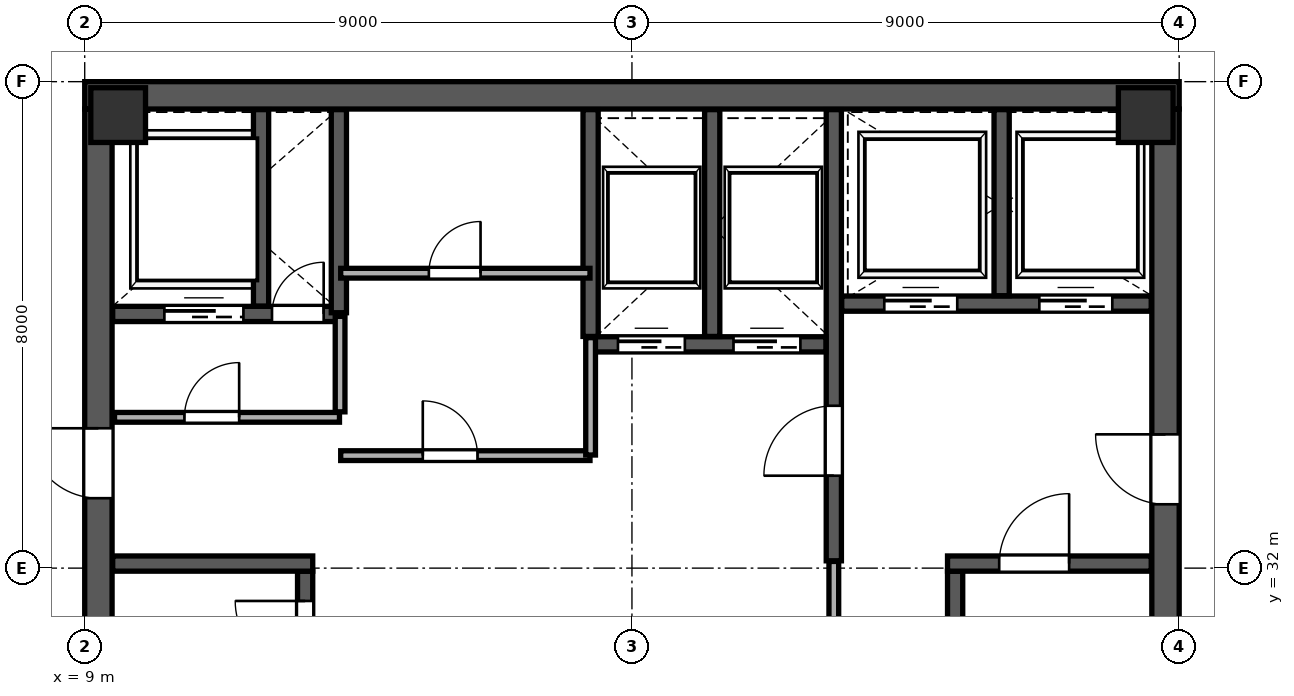
"""IFC4 building model, lengths in metres.
Left out: names, types, materials, properties, quantities, classifications, styles, units other than length and angle.
Written with IfcOpenShell. Run it as: python <this file> out.ifc"""

import sys

from ifc_helpers import new_model, si_unit, direction, frame, frame_2d, origin, origin_2d, place, context, subcontext, project, spatial, rectangle, extrude, source, transform, mapped, element, fill, save


model = new_model("IFC4")
c1 = context("Model", 3, precision=1e-05, world=origin(), true_north=direction((0.0, 1.0)))
c2 = subcontext(c1, "Body", "Model", "MODEL_VIEW")
j1 = project(units=[si_unit("LENGTHUNIT", "METRE"), si_unit("PLANEANGLEUNIT", "RADIAN")], contexts=[c1])
p1 = place(None, origin())
s1 = spatial("IfcSite", under=j1, at=p1, CompositionType="ELEMENT")
p2 = place(p1, origin())
s2 = spatial("IfcBuilding", under=s1, at=p2, CompositionType="ELEMENT")
p3 = place(p2, frame((0.0, 0.0, 266.8)))
s3 = spatial("IfcBuildingStorey", under=s2, at=p3, CompositionType="ELEMENT", Elevation=266.8)
m1 = source(origin(), c2, "Body", "SweptSolid", [
    extrude(rectangle(XDim=0.9, YDim=0.9, at=origin_2d()), origin(), (0.0, 0.0, 1.0), 4.198),
])
for number, where, z_axis, x_axis in (
    (1, (9.55, 39.45, 0.001), (0.0, 0.0, 1.0), (1.0, 0.0, 0.0)),
    (2, (26.45, 39.45, 0.001), (0.0, 0.0, 1.0), (1.0, 0.0, 0.0)),
):
    element("IfcColumn", number, at=place(p3, frame(where, z_axis=z_axis, x_axis=x_axis)), inside=s3, PredefinedType="COLUMN", context=c2, shape_type="MappedRepresentation", body=[
        mapped(m1, transform((0.0, 0.0, 0.0), scale=1.0)),
    ])
p4 = place(p3, frame((9.225, 24.45, 0.0), z_axis=(0.0, 0.0, 1.0), x_axis=(0.0, 1.0, 0.0)))
e3 = element("IfcWall", 3, at=p4, inside=s3, PredefinedType="SHEAR", context=c2, shape_type="SweptSolid", body=[
    extrude(rectangle(XDim=15.1, YDim=0.45, at=frame_2d((7.55, 0.0))), origin(), (0.0, 0.0, 1.0), 3.96),
])
p5 = place(p4, frame((8.7, 0.0, 0.0)))
e4 = element("IfcOpeningElement", 4, at=p5, cuts=e3, PredefinedType="OPENING", context=c2, shape_type="SweptSolid", body=[
    extrude(rectangle(XDim=1.15, YDim=2.2, at=frame_2d((0.575, 1.1))), frame((0.0, 0.235, 0.0), z_axis=(0.0, -1.0, 0.0), x_axis=(1.0, 0.0, 0.0)), (0.0, 0.0, 1.0), 0.47),
])
p6 = place(p3, frame((26.775, 24.45, 0.0), z_axis=(0.0, 0.0, 1.0), x_axis=(0.0, 1.0, 0.0)))
e5 = element("IfcWall", 5, at=p6, inside=s3, PredefinedType="SHEAR", context=c2, shape_type="SweptSolid", body=[
    extrude(rectangle(XDim=15.1, YDim=0.45, at=frame_2d((7.55, 0.0))), origin(), (0.0, 0.0, 1.0), 3.96),
])
p7 = place(p6, frame((8.6, 0.0, 0.0)))
e6 = element("IfcOpeningElement", 6, at=p7, cuts=e5, PredefinedType="OPENING", context=c2, shape_type="SweptSolid", body=[
    extrude(rectangle(XDim=1.15, YDim=2.2, at=frame_2d((0.575, 1.1))), frame((0.0, 0.235, 0.0), z_axis=(0.0, -1.0, 0.0), x_axis=(1.0, 0.0, 0.0)), (0.0, 0.0, 1.0), 0.47),
])
p8 = place(p3, frame((9.0, 39.775, 0.0), z_axis=(0.0, 0.0, 1.0), x_axis=(1.0, 0.0, 0.0)))
e7 = element("IfcWall", 7, at=p8, inside=s3, PredefinedType="SHEAR", context=c2, shape_type="SweptSolid", body=[
    extrude(rectangle(XDim=18.0, YDim=0.45, at=frame_2d((9.0, 0.0))), origin(), (0.0, 0.0, 1.0), 3.96),
])
p9 = place(p3, frame((12.625, 24.46, 0.0), z_axis=(0.0, 0.0, 1.0), x_axis=(0.0, 1.0, 0.0)))
e8 = element("IfcWall", 8, at=p9, inside=s3, PredefinedType="SHEAR", context=c2, shape_type="SweptSolid", body=[
    extrude(rectangle(XDim=7.49, YDim=0.25, at=frame_2d((3.745, 0.0))), origin(), (0.0, 0.0, 1.0), 3.96),
])
p10 = place(p9, frame((5.85, 0.0, 0.0)))
e9 = element("IfcOpeningElement", 9, at=p10, cuts=e8, PredefinedType="OPENING", context=c2, shape_type="SweptSolid", body=[
    extrude(rectangle(XDim=1.15, YDim=2.2, at=frame_2d((0.575, 1.1))), frame((0.0, 0.135, 0.0), z_axis=(0.0, -1.0, 0.0), x_axis=(1.0, 0.0, 0.0)), (0.0, 0.0, 1.0), 0.27),
])
p11 = place(p3, frame((9.46, 32.075, 0.0), z_axis=(0.0, 0.0, 1.0), x_axis=(1.0, 0.0, 0.0)))
e10 = element("IfcWall", 10, at=p11, inside=s3, PredefinedType="SHEAR", context=c2, shape_type="SweptSolid", body=[
    extrude(rectangle(XDim=3.29, YDim=0.25, at=frame_2d((1.645, 0.0))), origin(), (0.0, 0.0, 1.0), 3.96),
])
p12 = place(p3, frame((23.315, 24.46, 0.0), z_axis=(0.0, 0.0, 1.0), x_axis=(0.0, 1.0, 0.0)))
e11 = element("IfcWall", 11, at=p12, inside=s3, PredefinedType="SHEAR", context=c2, shape_type="SweptSolid", body=[
    extrude(rectangle(XDim=7.49, YDim=0.25, at=frame_2d((3.745, 0.0))), origin(), (0.0, 0.0, 1.0), 3.96),
])
p13 = place(p3, frame((23.19, 32.075, 0.0), z_axis=(0.0, 0.0, 1.0), x_axis=(1.0, 0.0, 0.0)))
e12 = element("IfcWall", 12, at=p13, inside=s3, PredefinedType="SHEAR", context=c2, shape_type="SweptSolid", body=[
    extrude(rectangle(XDim=3.35, YDim=0.25, at=frame_2d((1.675, 0.0))), origin(), (0.0, 0.0, 1.0), 3.96),
])
p14 = place(p13, frame((0.85, 0.0, 0.0)))
e13 = element("IfcOpeningElement", 13, at=p14, cuts=e12, PredefinedType="OPENING", context=c2, shape_type="SweptSolid", body=[
    extrude(rectangle(XDim=1.15, YDim=2.2, at=frame_2d((0.575, 1.1))), frame((0.0, 0.135, 0.0), z_axis=(0.0, -1.0, 0.0), x_axis=(1.0, 0.0, 0.0)), (0.0, 0.0, 1.0), 0.27),
])
p15 = place(p3, frame((21.32, 32.12, 0.0), z_axis=(0.0, 0.0, 1.0), x_axis=(0.0, 1.0, 0.0)))
e14 = element("IfcWall", 14, at=p15, inside=s3, PredefinedType="SHEAR", context=c2, shape_type="SweptSolid", body=[
    extrude(rectangle(XDim=7.42, YDim=0.25, at=frame_2d((3.71, 0.0))), origin(), (0.0, 0.0, 1.0), 3.96),
])
p16 = place(p15, frame((1.4, 0.0, 0.0)))
e15 = element("IfcOpeningElement", 15, at=p16, cuts=e14, PredefinedType="OPENING", context=c2, shape_type="SweptSolid", body=[
    extrude(rectangle(XDim=1.15, YDim=2.2, at=frame_2d((0.575, 1.1))), frame((0.0, 0.135, 0.0), z_axis=(0.0, -1.0, 0.0), x_axis=(1.0, 0.0, 0.0)), (0.0, 0.0, 1.0), 0.27),
])
p17 = place(p3, frame((9.46, 36.18, 0.0), z_axis=(0.0, 0.0, 1.0), x_axis=(1.0, 0.0, 0.0)))
e16 = element("IfcWall", 16, at=p17, inside=s3, PredefinedType="SHEAR", context=c2, shape_type="SweptSolid", body=[
    extrude(rectangle(XDim=3.79, YDim=0.25, at=frame_2d((1.895, 0.0))), origin(), (0.0, 0.0, 1.0), 3.96),
])
p18 = place(p17, frame((2.62, 0.0, 0.0)))
e17 = element("IfcOpeningElement", 17, at=p18, cuts=e16, PredefinedType="OPENING", context=c2, shape_type="SweptSolid", body=[
    extrude(rectangle(XDim=0.85, YDim=2.1, at=frame_2d((0.425, 1.05))), frame((0.0, 0.135, 0.0), z_axis=(0.0, -1.0, 0.0), x_axis=(1.0, 0.0, 0.0)), (0.0, 0.0, 1.0), 0.27),
])
p19 = place(p17, frame((0.85, 0.0, 0.0)))
e18 = element("IfcOpeningElement", 18, at=p19, cuts=e16, PredefinedType="OPENING", context=c2, shape_type="SweptSolid", body=[
    extrude(rectangle(XDim=1.3, YDim=2.25, at=frame_2d((0.65, 1.125))), frame((0.0, 0.135, 0.0), z_axis=(0.0, -1.0, 0.0), x_axis=(1.0, 0.0, 0.0)), (0.0, 0.0, 1.0), 0.27),
])
p20 = place(p3, frame((11.9, 36.31, 0.0), z_axis=(0.0, 0.0, 1.0), x_axis=(0.0, 1.0, 0.0)))
e19 = element("IfcWall", 19, at=p20, inside=s3, PredefinedType="SHEAR", context=c2, shape_type="SweptSolid", body=[
    extrude(rectangle(XDim=3.23, YDim=0.25, at=frame_2d((1.615, 0.0))), origin(), (0.0, 0.0, 1.0), 3.96),
])
p21 = place(p3, frame((21.45, 36.35, 0.0), z_axis=(0.0, 0.0, 1.0), x_axis=(1.0, 0.0, 0.0)))
e20 = element("IfcWall", 20, at=p21, inside=s3, PredefinedType="SHEAR", context=c2, shape_type="SweptSolid", body=[
    extrude(rectangle(XDim=5.09, YDim=0.25, at=frame_2d((2.545, 0.0))), origin(), (0.0, 0.0, 1.0), 3.96),
])
p22 = place(p21, frame((0.7, 0.0, 0.0)))
e21 = element("IfcOpeningElement", 21, at=p22, cuts=e20, PredefinedType="OPENING", context=c2, shape_type="SweptSolid", body=[
    extrude(rectangle(XDim=1.2, YDim=2.2, at=frame_2d((0.6, 1.1))), frame((0.0, 0.135, 0.0), z_axis=(0.0, -1.0, 0.0), x_axis=(1.0, 0.0, 0.0)), (0.0, 0.0, 1.0), 0.27),
])
p23 = place(p21, frame((3.25, 0.0, 0.0)))
e22 = element("IfcOpeningElement", 22, at=p23, cuts=e20, PredefinedType="OPENING", context=c2, shape_type="SweptSolid", body=[
    extrude(rectangle(XDim=1.2, YDim=2.2, at=frame_2d((0.6, 1.1))), frame((0.0, 0.135, 0.0), z_axis=(0.0, -1.0, 0.0), x_axis=(1.0, 0.0, 0.0)), (0.0, 0.0, 1.0), 0.27),
])
p24 = place(p3, frame((24.08, 36.48, 0.0), z_axis=(0.0, 0.0, 1.0), x_axis=(0.0, 1.0, 0.0)))
e23 = element("IfcWall", 23, at=p24, inside=s3, PredefinedType="SHEAR", context=c2, shape_type="SweptSolid", body=[
    extrude(rectangle(XDim=3.06, YDim=0.25, at=frame_2d((1.53, 0.0))), origin(), (0.0, 0.0, 1.0), 3.96),
])
p25 = place(p3, frame((13.18, 36.2, 0.0), z_axis=(0.0, 0.0, 1.0), x_axis=(0.0, 1.0, 0.0)))
e24 = element("IfcWall", 24, at=p25, inside=s3, PredefinedType="SHEAR", context=c2, shape_type="SweptSolid", body=[
    extrude(rectangle(XDim=3.34, YDim=0.25, at=frame_2d((1.67, 0.0))), origin(), (0.0, 0.0, 1.0), 3.96),
])
p26 = place(p3, frame((17.32, 35.68, 0.0), z_axis=(0.0, 0.0, 1.0), x_axis=(1.0, 0.0, 0.0)))
e25 = element("IfcWall", 25, at=p26, inside=s3, PredefinedType="SHEAR", context=c2, shape_type="SweptSolid", body=[
    extrude(rectangle(XDim=3.87, YDim=0.25, at=frame_2d((1.935, 0.0))), origin(), (0.0, 0.0, 1.0), 3.96),
])
p27 = place(p26, frame((0.45, 0.0, 0.0)))
e26 = element("IfcOpeningElement", 26, at=p27, cuts=e25, PredefinedType="OPENING", context=c2, shape_type="SweptSolid", body=[
    extrude(rectangle(XDim=1.1, YDim=2.2, at=frame_2d((0.55, 1.1))), frame((0.0, 0.135, 0.0), z_axis=(0.0, -1.0, 0.0), x_axis=(1.0, 0.0, 0.0)), (0.0, 0.0, 1.0), 0.27),
])
p28 = place(p26, frame((2.35, 0.0, 0.0)))
e27 = element("IfcOpeningElement", 27, at=p28, cuts=e25, PredefinedType="OPENING", context=c2, shape_type="SweptSolid", body=[
    extrude(rectangle(XDim=1.1, YDim=2.2, at=frame_2d((0.55, 1.1))), frame((0.0, 0.135, 0.0), z_axis=(0.0, -1.0, 0.0), x_axis=(1.0, 0.0, 0.0)), (0.0, 0.0, 1.0), 0.27),
])
for number, where, z_axis, x_axis in (
    (28, (17.32, 35.81, 0.0), (0.0, 0.0, 1.0), (0.0, 1.0, 0.0)),
    (29, (19.32, 35.81, 0.0), (0.0, 0.0, 1.0), (0.0, 1.0, 0.0)),
):
    element("IfcWall", number, at=place(p3, frame(where, z_axis=z_axis, x_axis=x_axis)), inside=s3, PredefinedType="SHEAR", context=c2, shape_type="SweptSolid", body=[
        extrude(rectangle(XDim=3.73, YDim=0.25, at=frame_2d((1.865, 0.0))), origin(), (0.0, 0.0, 1.0), 3.96),
    ])
p29 = place(p3, frame((9.49, 34.48, 0.0), z_axis=(0.0, 0.0, 1.0), x_axis=(1.0, 0.0, 0.0)))
e30 = element("IfcWall", 30, at=p29, inside=s3, PredefinedType="PARTITIONING", context=c2, shape_type="SweptSolid", body=[
    extrude(rectangle(XDim=3.7, YDim=0.16, at=frame_2d((1.85, 0.0))), origin(), (0.0, 0.0, 1.0), 3.96),
])
p30 = place(p29, frame((1.15, 0.0, 0.0)))
e31 = element("IfcOpeningElement", 31, at=p30, cuts=e30, PredefinedType="OPENING", context=c2, shape_type="SweptSolid", body=[
    extrude(rectangle(XDim=0.9, YDim=2.15, at=frame_2d((0.45, 1.075))), frame((0.0, 0.09, 0.0), z_axis=(0.0, -1.0, 0.0), x_axis=(1.0, 0.0, 0.0)), (0.0, 0.0, 1.0), 0.18),
])
p31 = place(p3, frame((13.2, 34.57, 0.0), z_axis=(0.0, 0.0, 1.0), x_axis=(0.0, 1.0, 0.0)))
e32 = element("IfcWall", 32, at=p31, inside=s3, PredefinedType="PARTITIONING", context=c2, shape_type="SweptSolid", body=[
    extrude(rectangle(XDim=1.57, YDim=0.16, at=frame_2d((0.785, 0.0))), origin(), (0.0, 0.0, 1.0), 3.96),
])
p32 = place(p3, frame((13.21, 33.85, 0.0), z_axis=(0.0, 0.0, 1.0), x_axis=(1.0, 0.0, 0.0)))
e33 = element("IfcWall", 33, at=p32, inside=s3, PredefinedType="PARTITIONING", context=c2, shape_type="SweptSolid", body=[
    extrude(rectangle(XDim=4.1, YDim=0.16, at=frame_2d((2.05, 0.0))), origin(), (0.0, 0.0, 1.0), 3.96),
])
p33 = place(p32, frame((1.35, 0.0, 0.0)))
e34 = element("IfcOpeningElement", 34, at=p33, cuts=e33, PredefinedType="OPENING", context=c2, shape_type="SweptSolid", body=[
    extrude(rectangle(XDim=0.9, YDim=2.15, at=frame_2d((0.45, 1.075))), frame((0.0, 0.09, 0.0), z_axis=(0.0, -1.0, 0.0), x_axis=(1.0, 0.0, 0.0)), (0.0, 0.0, 1.0), 0.18),
])
p34 = place(p3, frame((17.32, 33.86, 0.0), z_axis=(0.0, 0.0, 1.0), x_axis=(0.0, 1.0, 0.0)))
e35 = element("IfcWall", 35, at=p34, inside=s3, PredefinedType="PARTITIONING", context=c2, shape_type="SweptSolid", body=[
    extrude(rectangle(XDim=1.93, YDim=0.16, at=frame_2d((0.965, 0.0))), origin(), (0.0, 0.0, 1.0), 3.96),
])
p35 = place(p3, frame((13.21, 36.85, 0.0), z_axis=(0.0, 0.0, 1.0), x_axis=(1.0, 0.0, 0.0)))
e36 = element("IfcWall", 36, at=p35, inside=s3, PredefinedType="PARTITIONING", context=c2, shape_type="SweptSolid", body=[
    extrude(rectangle(XDim=4.1, YDim=0.16, at=frame_2d((2.05, 0.0))), origin(), (0.0, 0.0, 1.0), 3.96),
])
p36 = place(p35, frame((1.45, 0.0, 0.0)))
e37 = element("IfcOpeningElement", 37, at=p36, cuts=e36, PredefinedType="OPENING", context=c2, shape_type="SweptSolid", body=[
    extrude(rectangle(XDim=0.85, YDim=2.1, at=frame_2d((0.425, 1.05))), frame((0.0, 0.09, 0.0), z_axis=(0.0, -1.0, 0.0), x_axis=(1.0, 0.0, 0.0)), (0.0, 0.0, 1.0), 0.18),
])
p37 = place(p3, frame((21.32, 29.19, 0.0), z_axis=(0.0, 0.0, 1.0), x_axis=(0.0, 1.0, 0.0)))
e38 = element("IfcWall", 38, at=p37, inside=s3, PredefinedType="PARTITIONING", context=c2, shape_type="SweptSolid", body=[
    extrude(rectangle(XDim=2.92, YDim=0.16, at=frame_2d((1.46, 0.0))), origin(), (0.0, 0.0, 1.0), 3.96),
])
p38 = place(p3, frame((19.528, 51.245, 0.0), z_axis=(0.0, 0.0, 1.0), x_axis=(0.642782364439, -0.766048844374, 0.0)))
e39 = element("IfcWall", 39, at=p38, inside=s3, PredefinedType="PARTITIONING", context=c2, shape_type="SweptSolid", body=[
    extrude(rectangle(XDim=27.34, YDim=0.135, at=frame_2d((13.67, 0.0))), origin(), (0.0, 0.0, 1.0), 3.96),
])
p39 = place(p38, frame((10.8, 0.0, 0.0)))
e40 = element("IfcOpeningElement", 40, at=p39, cuts=e39, PredefinedType="OPENING", context=c2, shape_type="SweptSolid", body=[
    extrude(rectangle(XDim=0.95, YDim=2.15, at=frame_2d((0.475, 1.075))), frame((0.0, 0.078, 0.0), z_axis=(0.0, -1.0, 0.0), x_axis=(1.0, 0.0, 0.0)), (0.0, 0.0, 1.0), 0.155),
])
p40 = place(p3, frame((0.849, 35.624, 0.0), z_axis=(0.0, 0.0, 1.0), x_axis=(0.766042777978, 0.642789594119, 0.0)))
e41 = element("IfcWall", 41, at=p40, inside=s3, PredefinedType="PARTITIONING", context=c2, shape_type="SweptSolid", body=[
    extrude(rectangle(XDim=29.51, YDim=0.1, at=frame_2d((14.755, 0.0))), origin(), (0.0, 0.0, 1.0), 3.96),
])
p41 = place(p40, frame((2.6, 0.0, 0.0)))
e42 = element("IfcOpeningElement", 42, at=p41, cuts=e41, PredefinedType="OPENING", context=c2, shape_type="SweptSolid", body=[
    extrude(rectangle(XDim=0.95, YDim=2.15, at=frame_2d((0.475, 1.075))), frame((0.0, 0.06, 0.0), z_axis=(0.0, -1.0, 0.0), x_axis=(1.0, 0.0, 0.0)), (0.0, 0.0, 1.0), 0.12),
])
p42 = place(p3, frame((25.576, 20.577, 0.0), z_axis=(0.0, 0.0, 1.0), x_axis=(0.76604764673, 0.642783791752, 0.0)))
e43 = element("IfcWall", 43, at=p42, inside=s3, PredefinedType="PARTITIONING", context=c2, shape_type="SweptSolid", body=[
    extrude(rectangle(XDim=20.24, YDim=0.16, at=frame_2d((10.12, 0.0))), origin(), (0.0, 0.0, 1.0), 3.195),
])
m2 = source(origin(), c2, "Body", "SweptSolid", [
    extrude(rectangle(XDim=1.15, YDim=2.2, at=frame_2d((0.575, 1.1))), frame((0.0, 0.025, 0.0), z_axis=(0.0, -1.0, 0.0), x_axis=(1.0, 0.0, 0.0)), (0.0, 0.0, 1.0), 0.05),
])
p43 = place(p10, origin())
e44 = element("IfcDoor", 44, at=p43, inside=s3, OperationType="SINGLE_SWING_RIGHT", PredefinedType="DOOR", context=c2, shape_type="MappedRepresentation", body=[
    mapped(m2, transform((0.0, 0.0, 0.0), scale=1.0)),
])
fill(e9, e44)
m3 = source(origin(), c2, "Body", "SweptSolid", [
    extrude(rectangle(XDim=1.15, YDim=2.2, at=frame_2d((0.575, 1.1))), frame((0.0, 0.025, 0.0), z_axis=(0.0, -1.0, 0.0), x_axis=(1.0, 0.0, 0.0)), (0.0, 0.0, 1.0), 0.05),
])
p44 = place(p16, origin())
e45 = element("IfcDoor", 45, at=p44, inside=s3, OperationType="SINGLE_SWING_LEFT", PredefinedType="DOOR", context=c2, shape_type="MappedRepresentation", body=[
    mapped(m3, transform((0.0, 0.0, 0.0), scale=1.0)),
])
fill(e15, e45)
p45 = place(p14, origin())
e46 = element("IfcDoor", 46, at=p45, inside=s3, OperationType="SINGLE_SWING_RIGHT", PredefinedType="DOOR", context=c2, shape_type="MappedRepresentation", body=[
    mapped(m2, transform((0.0, 0.0, 0.0), scale=1.0)),
])
fill(e13, e46)
p46 = place(p7, origin())
e47 = element("IfcDoor", 47, at=p46, inside=s3, OperationType="SINGLE_SWING_RIGHT", PredefinedType="DOOR", context=c2, shape_type="MappedRepresentation", body=[
    mapped(m3, transform((0.0, 0.0, 0.0), scale=1.0)),
])
fill(e6, e47)
p47 = place(p5, origin())
e48 = element("IfcDoor", 48, at=p47, inside=s3, OperationType="SINGLE_SWING_RIGHT", PredefinedType="DOOR", context=c2, shape_type="MappedRepresentation", body=[
    mapped(m3, transform((0.0, 0.0, 0.0), scale=1.0)),
])
fill(e4, e48)
m4 = source(origin(), c2, "Body", "SweptSolid", [
    extrude(rectangle(XDim=0.85, YDim=2.1, at=frame_2d((0.425, 1.05))), frame((0.0, 0.025, 0.0), z_axis=(0.0, -1.0, 0.0), x_axis=(1.0, 0.0, 0.0)), (0.0, 0.0, 1.0), 0.05),
])
p48 = place(p18, origin())
e49 = element("IfcDoor", 49, at=p48, inside=s3, OperationType="SINGLE_SWING_RIGHT", PredefinedType="DOOR", context=c2, shape_type="MappedRepresentation", body=[
    mapped(m4, transform((0.0, 0.0, 0.0), scale=1.0)),
])
fill(e17, e49)
m5 = source(origin(), c2, "Body", "SweptSolid", [
    extrude(rectangle(XDim=1.1, YDim=2.2, at=frame_2d((0.55, 1.1))), frame((0.0, 0.025, 0.0), z_axis=(0.0, -1.0, 0.0), x_axis=(1.0, 0.0, 0.0)), (0.0, 0.0, 1.0), 0.05),
])
p49 = place(p27, origin())
e50 = element("IfcDoor", 50, at=p49, inside=s3, OperationType="SLIDING_TO_LEFT", PredefinedType="DOOR", context=c2, shape_type="MappedRepresentation", body=[
    mapped(m5, transform((0.0, 0.0, 0.0), scale=1.0)),
])
fill(e26, e50)
p50 = place(p28, origin())
e51 = element("IfcDoor", 51, at=p50, inside=s3, OperationType="SLIDING_TO_RIGHT", PredefinedType="DOOR", context=c2, shape_type="MappedRepresentation", body=[
    mapped(m5, transform((0.0, 0.0, 0.0), scale=1.0)),
])
fill(e27, e51)
m6 = source(origin(), c2, "Body", "SweptSolid", [
    extrude(rectangle(XDim=1.2, YDim=2.2, at=frame_2d((0.6, 1.1))), frame((0.0, 0.025, 0.0), z_axis=(0.0, -1.0, 0.0), x_axis=(1.0, 0.0, 0.0)), (0.0, 0.0, 1.0), 0.05),
])
p51 = place(p22, origin())
e52 = element("IfcDoor", 52, at=p51, inside=s3, OperationType="SLIDING_TO_LEFT", PredefinedType="DOOR", context=c2, shape_type="MappedRepresentation", body=[
    mapped(m6, transform((0.0, 0.0, 0.0), scale=1.0)),
])
fill(e21, e52)
p52 = place(p23, origin())
e53 = element("IfcDoor", 53, at=p52, inside=s3, OperationType="SLIDING_TO_RIGHT", PredefinedType="DOOR", context=c2, shape_type="MappedRepresentation", body=[
    mapped(m6, transform((0.0, 0.0, 0.0), scale=1.0)),
])
fill(e22, e53)
m7 = source(origin(), c2, "Body", "SweptSolid", [
    extrude(rectangle(XDim=1.3, YDim=2.25, at=frame_2d((0.65, 1.125))), frame((0.0, 0.025, 0.0), z_axis=(0.0, -1.0, 0.0), x_axis=(1.0, 0.0, 0.0)), (0.0, 0.0, 1.0), 0.05),
])
p53 = place(p19, origin())
e54 = element("IfcDoor", 54, at=p53, inside=s3, OperationType="SLIDING_TO_LEFT", PredefinedType="DOOR", context=c2, shape_type="MappedRepresentation", body=[
    mapped(m7, transform((0.0, 0.0, 0.0), scale=1.0)),
])
fill(e18, e54)
m8 = source(origin(), c2, "Body", "SweptSolid", [
    extrude(rectangle(XDim=0.9, YDim=2.15, at=frame_2d((0.45, 1.075))), frame((0.0, 0.025, 0.0), z_axis=(0.0, -1.0, 0.0), x_axis=(1.0, 0.0, 0.0)), (0.0, 0.0, 1.0), 0.05),
])
p54 = place(p30, origin())
e55 = element("IfcDoor", 55, at=p54, inside=s3, OperationType="SINGLE_SWING_RIGHT", PredefinedType="DOOR", context=c2, shape_type="MappedRepresentation", body=[
    mapped(m8, transform((0.0, 0.0, 0.0), scale=1.0)),
])
fill(e31, e55)
p55 = place(p33, origin())
e56 = element("IfcDoor", 56, at=p55, inside=s3, OperationType="SINGLE_SWING_LEFT", PredefinedType="DOOR", context=c2, shape_type="MappedRepresentation", body=[
    mapped(m8, transform((0.0, 0.0, 0.0), scale=1.0)),
])
fill(e34, e56)
p56 = place(p36, origin())
e57 = element("IfcDoor", 57, at=p56, inside=s3, OperationType="SINGLE_SWING_RIGHT", PredefinedType="DOOR", context=c2, shape_type="MappedRepresentation", body=[
    mapped(m4, transform((0.0, 0.0, 0.0), scale=1.0)),
])
fill(e37, e57)
save(model, sys.argv[1])
